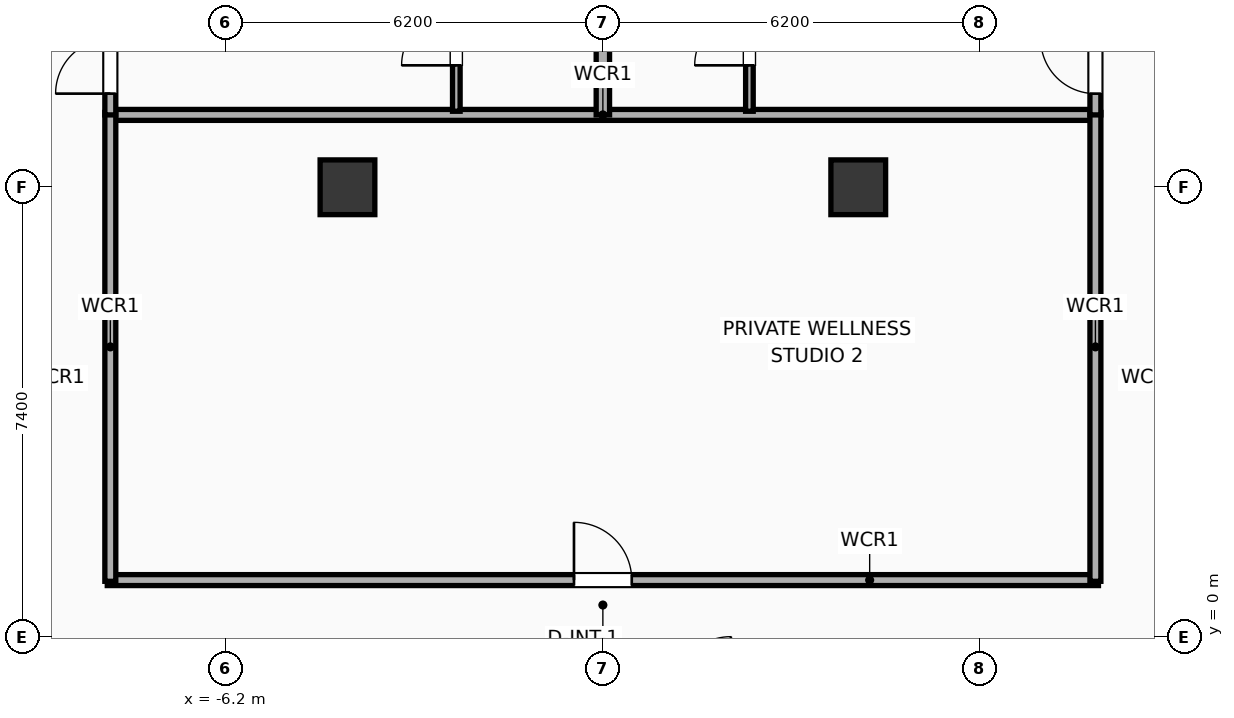
"""IFC4 building model, lengths in metres.
Left out: names, types, materials, properties, quantities, classifications, styles, units other than length and angle.
Written with IfcOpenShell. Run it as: python <this file> out.ifc"""

import sys

from ifc_helpers import new_model, si_unit, direction, frame, frame_2d, origin, origin_2d, place, context, subcontext, project, spatial, rectangle, extrude, element, fill, save


model = new_model("IFC4")
c1 = context("Model", 3, precision=1e-05, world=origin(), true_north=direction((0.0, 1.0)))
c2 = subcontext(c1, "Body", "Model", "MODEL_VIEW")
j1 = project(units=[si_unit("LENGTHUNIT", "METRE"), si_unit("PLANEANGLEUNIT", "RADIAN")], contexts=[c1])
p1 = place(None, origin())
s1 = spatial("IfcSite", under=j1, at=p1, CompositionType="ELEMENT")
p2 = place(p1, origin())
s2 = spatial("IfcBuilding", under=s1, at=p2, CompositionType="ELEMENT")
p3 = place(p2, frame((0.0, 0.0, 179.4)))
s3 = spatial("IfcBuildingStorey", under=s2, at=p3, CompositionType="ELEMENT", Elevation=179.4)
for number, where, z_axis, x_axis in (
    (1, (-4.2, 7.4, 0.0), (0.0, 0.0, 1.0), (1.0, 0.0, 0.0)),
    (2, (4.2, 7.4, 0.0), (0.0, 0.0, 1.0), (1.0, 0.0, 0.0)),
):
    element("IfcColumn", number, at=place(p3, frame(where, z_axis=z_axis, x_axis=x_axis)), inside=s3, PredefinedType="COLUMN", context=c2, shape_type="SweptSolid", body=[
        extrude(rectangle(XDim=0.9, YDim=0.9, at=origin_2d()), origin(), (0.0, 0.0, 1.0), 3.9),
    ])
p4 = place(p3, frame((-8.15, 8.59, 0.0), z_axis=(0.0, 0.0, 1.0), x_axis=(1.0, 0.0, 0.0)))
e3 = element("IfcWall", 3, at=p4, inside=s3, PredefinedType="PARTITIONING", context=c2, shape_type="SweptSolid", body=[
    extrude(rectangle(XDim=16.3, YDim=0.18, at=frame_2d((8.15, 0.0))), origin(), (0.0, 0.0, 1.0), 3.65),
])
p5 = place(p3, frame((-8.15, 0.94, 0.0), z_axis=(0.0, 0.0, 1.0), x_axis=(1.0, 0.0, 0.0)))
e4 = element("IfcWall", 4, at=p5, inside=s3, PredefinedType="PARTITIONING", context=c2, shape_type="SweptSolid", body=[
    extrude(rectangle(XDim=16.3, YDim=0.18, at=frame_2d((8.15, 0.0))), origin(), (0.0, 0.0, 1.0), 3.65),
])
p6 = place(p5, frame((7.675, 0.0, 0.0)))
e5 = element("IfcOpeningElement", 5, at=p6, cuts=e4, PredefinedType="OPENING", context=c2, shape_type="SweptSolid", body=[
    extrude(rectangle(XDim=0.95, YDim=2.05, at=frame_2d((0.475, 1.025))), frame((0.0, 0.1, 0.0), z_axis=(0.0, -1.0, 0.0), x_axis=(1.0, 0.0, 0.0)), (0.0, 0.0, 1.0), 0.2),
])
for number, where, z_axis, x_axis in (
    (6, (-8.1, 0.92, 0.0), (0.0, 0.0, 1.0), (0.0, 1.0, 0.0)),
    (7, (8.1, 0.92, 0.0), (0.0, 0.0, 1.0), (0.0, 1.0, 0.0)),
):
    element("IfcWall", number, at=place(p3, frame(where, z_axis=z_axis, x_axis=x_axis)), inside=s3, PredefinedType="PARTITIONING", context=c2, shape_type="SweptSolid", body=[
        extrude(rectangle(XDim=7.71, YDim=0.18, at=frame_2d((3.855, 0.0))), origin(), (0.0, 0.0, 1.0), 3.65),
    ])
p7 = place(p3, frame((-2.41, 8.65, 0.0), z_axis=(0.0, 0.0, 1.0), x_axis=(0.0, 1.0, 0.0)))
e8 = element("IfcWall", 8, at=p7, inside=s3, PredefinedType="PARTITIONING", context=c2, shape_type="SweptSolid", body=[
    extrude(rectangle(XDim=2.41, YDim=0.125, at=frame_2d((1.205, 0.0))), origin(), (0.0, 0.0, 1.0), 3.65),
])
p8 = place(p7, frame((0.755, 0.0, 0.0)))
e9 = element("IfcOpeningElement", 9, at=p8, cuts=e8, PredefinedType="OPENING", context=c2, shape_type="SweptSolid", body=[
    extrude(rectangle(XDim=0.9, YDim=2.05, at=frame_2d((0.45, 1.025))), frame((0.0, 0.073, 0.0), z_axis=(0.0, -1.0, 0.0), x_axis=(1.0, 0.0, 0.0)), (0.0, 0.0, 1.0), 0.145),
])
p9 = place(p3, frame((-8.1, 8.59, 0.0), z_axis=(0.0, 0.0, 1.0), x_axis=(0.0, 1.0, 0.0)))
e10 = element("IfcWall", 10, at=p9, inside=s3, PredefinedType="PARTITIONING", context=c2, shape_type="SweptSolid", body=[
    extrude(rectangle(XDim=10.636, YDim=0.18, at=frame_2d((5.318, 0.0))), origin(), (0.0, 0.0, 1.0), 3.65),
])
p10 = place(p9, frame((0.35, 0.0, 0.0)))
e11 = element("IfcOpeningElement", 11, at=p10, cuts=e10, PredefinedType="OPENING", context=c2, shape_type="SweptSolid", body=[
    extrude(rectangle(XDim=0.9, YDim=2.05, at=frame_2d((0.45, 1.025))), frame((0.0, 0.1, 0.0), z_axis=(0.0, -1.0, 0.0), x_axis=(1.0, 0.0, 0.0)), (0.0, 0.0, 1.0), 0.2),
])
p11 = place(p3, frame((2.41, 8.65, 0.0), z_axis=(0.0, 0.0, 1.0), x_axis=(0.0, 1.0, 0.0)))
e12 = element("IfcWall", 12, at=p11, inside=s3, PredefinedType="PARTITIONING", context=c2, shape_type="SweptSolid", body=[
    extrude(rectangle(XDim=2.41, YDim=0.125, at=frame_2d((1.205, 0.0))), origin(), (0.0, 0.0, 1.0), 3.65),
])
p12 = place(p11, frame((0.755, 0.0, 0.0)))
e13 = element("IfcOpeningElement", 13, at=p12, cuts=e12, PredefinedType="OPENING", context=c2, shape_type="SweptSolid", body=[
    extrude(rectangle(XDim=0.9, YDim=2.05, at=frame_2d((0.45, 1.025))), frame((0.0, 0.073, 0.0), z_axis=(0.0, -1.0, 0.0), x_axis=(1.0, 0.0, 0.0)), (0.0, 0.0, 1.0), 0.145),
])
p13 = place(p3, frame((8.1, 8.59, 0.0), z_axis=(0.0, 0.0, 1.0), x_axis=(0.0, 1.0, 0.0)))
e14 = element("IfcWall", 14, at=p13, inside=s3, PredefinedType="PARTITIONING", context=c2, shape_type="SweptSolid", body=[
    extrude(rectangle(XDim=12.339, YDim=0.18, at=frame_2d((6.169, 0.0))), origin(), (0.0, 0.0, 1.0), 3.65),
])
p14 = place(p13, frame((0.35, 0.0, 0.0)))
e15 = element("IfcOpeningElement", 15, at=p14, cuts=e14, PredefinedType="OPENING", context=c2, shape_type="SweptSolid", body=[
    extrude(rectangle(XDim=0.9, YDim=2.05, at=frame_2d((0.45, 1.025))), frame((0.0, 0.1, 0.0), z_axis=(0.0, -1.0, 0.0), x_axis=(1.0, 0.0, 0.0)), (0.0, 0.0, 1.0), 0.2),
])
p15 = place(p3, frame((0.0, 8.59, 0.0), z_axis=(0.0, 0.0, 1.0), x_axis=(0.0, 1.0, 0.0)))
e16 = element("IfcWall", 16, at=p15, inside=s3, PredefinedType="PARTITIONING", context=c2, shape_type="SweptSolid", body=[
    extrude(rectangle(XDim=11.488, YDim=0.22, at=frame_2d((5.744, 0.0))), origin(), (0.0, 0.0, 1.0), 3.04),
])
p16 = place(p6, origin())
e17 = element("IfcDoor", 17, at=p16, inside=s3, OperationType="SINGLE_SWING_LEFT", PredefinedType="DOOR", context=c2, shape_type="SweptSolid", body=[
    extrude(rectangle(XDim=0.95, YDim=2.05, at=frame_2d((0.475, 1.025))), frame((0.0, 0.025, 0.0), z_axis=(0.0, -1.0, 0.0), x_axis=(1.0, 0.0, 0.0)), (0.0, 0.0, 1.0), 0.05),
])
fill(e5, e17)
p17 = place(p8, origin())
e18 = element("IfcDoor", 18, at=p17, inside=s3, OperationType="SINGLE_SWING_LEFT", PredefinedType="DOOR", context=c2, shape_type="SweptSolid", body=[
    extrude(rectangle(XDim=0.9, YDim=2.05, at=frame_2d((0.45, 1.025))), frame((0.0, 0.025, 0.0), z_axis=(0.0, -1.0, 0.0), x_axis=(1.0, 0.0, 0.0)), (0.0, 0.0, 1.0), 0.05),
])
fill(e9, e18)
p18 = place(p10, origin())
e19 = element("IfcDoor", 19, at=p18, inside=s3, OperationType="SINGLE_SWING_LEFT", PredefinedType="DOOR", context=c2, shape_type="SweptSolid", body=[
    extrude(rectangle(XDim=0.9, YDim=2.05, at=frame_2d((0.45, 1.025))), frame((0.0, 0.025, 0.0), z_axis=(0.0, -1.0, 0.0), x_axis=(1.0, 0.0, 0.0)), (0.0, 0.0, 1.0), 0.05),
])
fill(e11, e19)
p19 = place(p12, origin())
e20 = element("IfcDoor", 20, at=p19, inside=s3, OperationType="SINGLE_SWING_LEFT", PredefinedType="DOOR", context=c2, shape_type="SweptSolid", body=[
    extrude(rectangle(XDim=0.9, YDim=2.05, at=frame_2d((0.45, 1.025))), frame((0.0, 0.025, 0.0), z_axis=(0.0, -1.0, 0.0), x_axis=(1.0, 0.0, 0.0)), (0.0, 0.0, 1.0), 0.05),
])
fill(e13, e20)
p20 = place(p14, origin())
e21 = element("IfcDoor", 21, at=p20, inside=s3, OperationType="SINGLE_SWING_RIGHT", PredefinedType="DOOR", context=c2, shape_type="SweptSolid", body=[
    extrude(rectangle(XDim=0.9, YDim=2.05, at=frame_2d((0.45, 1.025))), frame((0.0, 0.025, 0.0), z_axis=(0.0, -1.0, 0.0), x_axis=(1.0, 0.0, 0.0)), (0.0, 0.0, 1.0), 0.05),
])
fill(e15, e21)
save(model, sys.argv[1])
